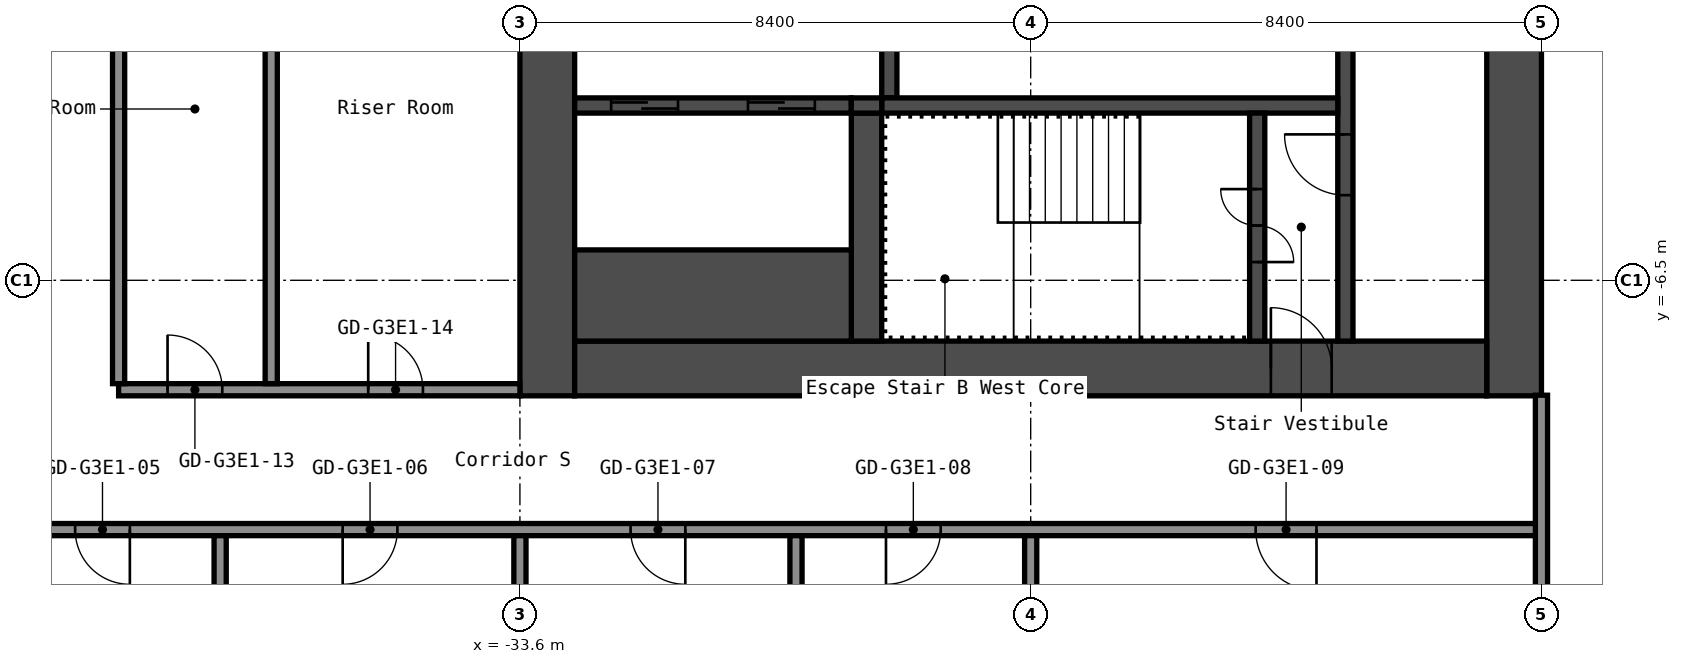
"""IFC4 building model, lengths in metres.
Left out: names, types, materials, properties, quantities, classifications, styles, units other than length and angle.
Written with IfcOpenShell. Run it as: python <this file> out.ifc"""

import sys

from ifc_helpers import new_model, si_unit, direction, frame, frame_2d, origin, place, context, subcontext, project, spatial, rectangle, extrude, element, fill, save


model = new_model("IFC4")
c1 = context("Model", 3, precision=1e-05, world=origin(), true_north=direction((0.0, 1.0)))
c2 = subcontext(c1, "Body", "Model", "MODEL_VIEW")
j1 = project(units=[si_unit("LENGTHUNIT", "METRE"), si_unit("PLANEANGLEUNIT", "RADIAN")], contexts=[c1])
p1 = place(None, origin())
s1 = spatial("IfcSite", under=j1, at=p1, CompositionType="ELEMENT")
p2 = place(p1, origin())
s2 = spatial("IfcBuilding", under=s1, at=p2, CompositionType="ELEMENT")
p3 = place(p2, frame((0.0, 0.0, 159.8)))
s3 = spatial("IfcBuildingStorey", under=s2, at=p3, CompositionType="ELEMENT", Elevation=159.8)
p4 = place(p3, frame((-17.25, -8.4, 0.0), z_axis=(0.0, 0.0, 1.0), x_axis=(0.0, 1.0, 0.0)))
e1 = element("IfcWall", 1, at=p4, inside=s3, PredefinedType="SHEAR", context=c2, shape_type="SweptSolid", body=[
    extrude(rectangle(XDim=16.8, YDim=0.9, at=frame_2d((8.4, 0.0))), origin(), (0.0, 0.0, 1.0), 2.75),
])
p5 = place(p4, frame((7.1, 0.0, 0.0)))
e2 = element("IfcOpeningElement", 2, at=p5, cuts=e1, PredefinedType="OPENING", context=c2, shape_type="SweptSolid", body=[
    extrude(rectangle(XDim=1.6, YDim=2.1, at=frame_2d((0.8, 1.05))), frame((0.0, 0.46, 0.0), z_axis=(0.0, -1.0, 0.0), x_axis=(1.0, 0.0, 0.0)), (0.0, 0.0, 1.0), 0.92),
])
p6 = place(p3, frame((-33.15, -8.4, 0.0), z_axis=(0.0, 0.0, 1.0), x_axis=(0.0, 1.0, 0.0)))
e3 = element("IfcWall", 3, at=p6, inside=s3, PredefinedType="SHEAR", context=c2, shape_type="SweptSolid", body=[
    extrude(rectangle(XDim=16.8, YDim=0.9, at=frame_2d((8.4, 0.0))), origin(), (0.0, 0.0, 1.0), 2.75),
])
p7 = place(p3, frame((-32.7, -7.95, 0.0), z_axis=(0.0, 0.0, 1.0), x_axis=(1.0, 0.0, 0.0)))
e4 = element("IfcWall", 4, at=p7, inside=s3, PredefinedType="SHEAR", context=c2, shape_type="SweptSolid", body=[
    extrude(rectangle(XDim=15.0, YDim=0.9, at=frame_2d((7.5, 0.0))), origin(), (0.0, 0.0, 1.0), 2.75),
])
p8 = place(p7, frame((11.45, 0.0, 0.0)))
e5 = element("IfcOpeningElement", 5, at=p8, cuts=e4, PredefinedType="OPENING", context=c2, shape_type="SweptSolid", body=[
    extrude(rectangle(XDim=1.0, YDim=2.1, at=frame_2d((0.5, 1.05))), frame((0.0, 0.46, 0.0), z_axis=(0.0, -1.0, 0.0), x_axis=(1.0, 0.0, 0.0)), (0.0, 0.0, 1.0), 0.92),
])
p9 = place(p3, frame((-20.025, -7.5, 0.0), z_axis=(0.0, 0.0, 1.0), x_axis=(0.0, 1.0, 0.0)))
e6 = element("IfcWall", 6, at=p9, inside=s3, PredefinedType="SHEAR", context=c2, shape_type="SweptSolid", body=[
    extrude(rectangle(XDim=6.3, YDim=0.25, at=frame_2d((3.15, 0.0))), origin(), (0.0, 0.0, 1.0), 2.75),
])
p10 = place(p9, frame((2.4, 0.0, 0.0)))
e7 = element("IfcOpeningElement", 7, at=p10, cuts=e6, PredefinedType="OPENING", context=c2, shape_type="SweptSolid", body=[
    extrude(rectangle(XDim=1.0, YDim=2.1, at=frame_2d((0.5, 1.05))), frame((0.0, 0.135, 0.0), z_axis=(0.0, -1.0, 0.0), x_axis=(1.0, 0.0, 0.0)), (0.0, 0.0, 1.0), 0.27),
])
p11 = place(p3, frame((-27.525, -3.5, 0.0), z_axis=(0.0, 0.0, 1.0), x_axis=(0.0, 1.0, 0.0)))
e8 = element("IfcWall", 8, at=p11, inside=s3, PredefinedType="SHEAR", context=c2, shape_type="SweptSolid", body=[
    extrude(rectangle(XDim=2.05, YDim=0.25, at=frame_2d((1.025, 0.0))), origin(), (0.0, 0.0, 1.0), 2.75),
])
p12 = place(p3, frame((-27.65, -3.625, 0.0), z_axis=(0.0, 0.0, 1.0), x_axis=(1.0, 0.0, 0.0)))
e9 = element("IfcWall", 9, at=p12, inside=s3, PredefinedType="SHEAR", context=c2, shape_type="SweptSolid", body=[
    extrude(rectangle(XDim=7.5, YDim=0.25, at=frame_2d((3.75, 0.0))), origin(), (0.0, 0.0, 1.0), 2.75),
])
p13 = place(p3, frame((-21.475, -7.5, 0.0), z_axis=(0.0, 0.0, 1.0), x_axis=(0.0, 1.0, 0.0)))
e10 = element("IfcWall", 10, at=p13, inside=s3, PredefinedType="SHEAR", context=c2, shape_type="SweptSolid", body=[
    extrude(rectangle(XDim=3.75, YDim=0.25, at=frame_2d((1.875, 0.0))), origin(), (0.0, 0.0, 1.0), 2.75),
])
p14 = place(p13, frame((1.3, 0.0, 0.0)))
e11 = element("IfcOpeningElement", 11, at=p14, cuts=e10, PredefinedType="OPENING", context=c2, shape_type="SweptSolid", body=[
    extrude(rectangle(XDim=1.2, YDim=2.1, at=frame_2d((0.6, 1.05))), frame((0.0, 0.135, 0.0), z_axis=(0.0, -1.0, 0.0), x_axis=(1.0, 0.0, 0.0)), (0.0, 0.0, 1.0), 0.27),
])
p15 = place(p3, frame((-27.9, -7.5, 0.0), z_axis=(0.0, 0.0, 1.0), x_axis=(0.0, 1.0, 0.0)))
e12 = element("IfcWall", 12, at=p15, inside=s3, PredefinedType="SHEAR", context=c2, shape_type="SweptSolid", body=[
    extrude(rectangle(XDim=3.75, YDim=0.5, at=frame_2d((1.875, 0.0))), origin(), (0.0, 0.0, 1.0), 2.75),
])
p16 = place(p3, frame((-32.7, -3.625, 0.0), z_axis=(0.0, 0.0, 1.0), x_axis=(1.0, 0.0, 0.0)))
e13 = element("IfcWall", 13, at=p16, inside=s3, PredefinedType="SHEAR", context=c2, shape_type="SweptSolid", body=[
    extrude(rectangle(XDim=4.55, YDim=0.25, at=frame_2d((2.275, 0.0))), origin(), (0.0, 0.0, 1.0), 2.75),
])
p17 = place(p16, frame((2.85, 0.0, 0.0)))
e14 = element("IfcOpeningElement", 14, at=p17, cuts=e13, PredefinedType="OPENING", context=c2, shape_type="SweptSolid", body=[
    extrude(rectangle(XDim=1.1, YDim=2.1, at=frame_2d((0.55, 1.05))), frame((0.0, 0.135, 0.0), z_axis=(0.0, -1.0, 0.0), x_axis=(1.0, 0.0, 0.0)), (0.0, 0.0, 1.0), 0.27),
])
p18 = place(p16, frame((0.6, 0.0, 0.0)))
e15 = element("IfcOpeningElement", 15, at=p18, cuts=e13, PredefinedType="OPENING", context=c2, shape_type="SweptSolid", body=[
    extrude(rectangle(XDim=1.1, YDim=2.1, at=frame_2d((0.55, 1.05))), frame((0.0, 0.135, 0.0), z_axis=(0.0, -1.0, 0.0), x_axis=(1.0, 0.0, 0.0)), (0.0, 0.0, 1.0), 0.27),
])
p19 = place(p3, frame((-32.7, -6.75, 0.0), z_axis=(0.0, 0.0, 1.0), x_axis=(1.0, 0.0, 0.0)))
e16 = element("IfcWall", 16, at=p19, inside=s3, PredefinedType="SHEAR", context=c2, shape_type="SweptSolid", body=[
    extrude(rectangle(XDim=4.55, YDim=1.5, at=frame_2d((2.275, 0.0))), origin(), (0.0, 0.0, 1.0), 2.75),
])
p20 = place(p3, frame((-28.15, -3.625, 0.0), z_axis=(0.0, 0.0, 1.0), x_axis=(1.0, 0.0, 0.0)))
e17 = element("IfcWall", 17, at=p20, inside=s3, PredefinedType="SHEAR", context=c2, shape_type="SweptSolid", body=[
    extrude(rectangle(XDim=0.5, YDim=0.25, at=frame_2d((0.25, 0.0))), origin(), (0.0, 0.0, 1.0), 2.75),
])
p21 = place(p3, frame((-42.7, -10.6, 0.0), z_axis=(0.0, 0.0, 1.0), x_axis=(1.0, 0.0, 0.0)))
e18 = element("IfcWall", 18, at=p21, inside=s3, PredefinedType="PARTITIONING", context=c2, shape_type="SweptSolid", body=[
    extrude(rectangle(XDim=25.9, YDim=0.2, at=frame_2d((12.95, 0.0))), origin(), (0.0, 0.0, 1.0), 2.75),
])
p22 = place(p21, frame((1.785, 0.0, 0.0)))
e19 = element("IfcOpeningElement", 19, at=p22, cuts=e18, PredefinedType="OPENING", context=c2, shape_type="SweptSolid", body=[
    extrude(rectangle(XDim=0.9, YDim=2.1, at=frame_2d((0.45, 1.05))), frame((0.0, 0.11, 0.0), z_axis=(0.0, -1.0, 0.0), x_axis=(1.0, 0.0, 0.0)), (0.0, 0.0, 1.0), 0.22),
])
p23 = place(p21, frame((6.185, 0.0, 0.0)))
e20 = element("IfcOpeningElement", 20, at=p23, cuts=e18, PredefinedType="OPENING", context=c2, shape_type="SweptSolid", body=[
    extrude(rectangle(XDim=0.9, YDim=2.1, at=frame_2d((0.45, 1.05))), frame((0.0, 0.11, 0.0), z_axis=(0.0, -1.0, 0.0), x_axis=(1.0, 0.0, 0.0)), (0.0, 0.0, 1.0), 0.22),
])
p24 = place(p21, frame((10.92, 0.0, 0.0)))
e21 = element("IfcOpeningElement", 21, at=p24, cuts=e18, PredefinedType="OPENING", context=c2, shape_type="SweptSolid", body=[
    extrude(rectangle(XDim=0.9, YDim=2.1, at=frame_2d((0.45, 1.05))), frame((0.0, 0.11, 0.0), z_axis=(0.0, -1.0, 0.0), x_axis=(1.0, 0.0, 0.0)), (0.0, 0.0, 1.0), 0.22),
])
p25 = place(p21, frame((15.12, 0.0, 0.0)))
e22 = element("IfcOpeningElement", 22, at=p25, cuts=e18, PredefinedType="OPENING", context=c2, shape_type="SweptSolid", body=[
    extrude(rectangle(XDim=0.9, YDim=2.1, at=frame_2d((0.45, 1.05))), frame((0.0, 0.11, 0.0), z_axis=(0.0, -1.0, 0.0), x_axis=(1.0, 0.0, 0.0)), (0.0, 0.0, 1.0), 0.22),
])
p26 = place(p21, frame((21.2, 0.0, 0.0)))
e23 = element("IfcOpeningElement", 23, at=p26, cuts=e18, PredefinedType="OPENING", context=c2, shape_type="SweptSolid", body=[
    extrude(rectangle(XDim=1.0, YDim=2.1, at=frame_2d((0.5, 1.05))), frame((0.0, 0.11, 0.0), z_axis=(0.0, -1.0, 0.0), x_axis=(1.0, 0.0, 0.0)), (0.0, 0.0, 1.0), 0.22),
])
p27 = place(p3, frame((-40.2, -8.3, 0.0), z_axis=(0.0, 0.0, 1.0), x_axis=(1.0, 0.0, 0.0)))
e24 = element("IfcWall", 24, at=p27, inside=s3, PredefinedType="PARTITIONING", context=c2, shape_type="SweptSolid", body=[
    extrude(rectangle(XDim=6.6, YDim=0.2, at=frame_2d((3.3, 0.0))), origin(), (0.0, 0.0, 1.0), 2.75),
])
p28 = place(p27, frame((0.805, 0.0, 0.0)))
e25 = element("IfcOpeningElement", 25, at=p28, cuts=e24, PredefinedType="OPENING", context=c2, shape_type="SweptSolid", body=[
    extrude(rectangle(XDim=0.9, YDim=2.1, at=frame_2d((0.45, 1.05))), frame((0.0, 0.11, 0.0), z_axis=(0.0, -1.0, 0.0), x_axis=(1.0, 0.0, 0.0)), (0.0, 0.0, 1.0), 0.22),
])
p29 = place(p27, frame((4.105, 0.0, 0.0)))
e26 = element("IfcOpeningElement", 26, at=p29, cuts=e24, PredefinedType="OPENING", context=c2, shape_type="SweptSolid", body=[
    extrude(rectangle(XDim=0.9, YDim=2.1, at=frame_2d((0.45, 1.05))), frame((0.0, 0.11, 0.0), z_axis=(0.0, -1.0, 0.0), x_axis=(1.0, 0.0, 0.0)), (0.0, 0.0, 1.0), 0.22),
])
p30 = place(p3, frame((-40.2, -8.2, 0.0), z_axis=(0.0, 0.0, 1.0), x_axis=(0.0, 1.0, 0.0)))
e27 = element("IfcWall", 27, at=p30, inside=s3, PredefinedType="PARTITIONING", context=c2, shape_type="SweptSolid", body=[
    extrude(rectangle(XDim=16.4, YDim=0.2, at=frame_2d((8.2, 0.0))), origin(), (0.0, 0.0, 1.0), 2.75),
])
p31 = place(p3, frame((-38.53, -19.3, 0.0), z_axis=(0.0, 0.0, 1.0), x_axis=(0.0, 1.0, 0.0)))
e28 = element("IfcWall", 28, at=p31, inside=s3, PredefinedType="PARTITIONING", context=c2, shape_type="SweptSolid", body=[
    extrude(rectangle(XDim=8.6, YDim=0.2, at=frame_2d((4.3, 0.0))), origin(), (0.0, 0.0, 1.0), 2.75),
])
p32 = place(p3, frame((-37.69, -8.2, 0.0), z_axis=(0.0, 0.0, 1.0), x_axis=(0.0, 1.0, 0.0)))
e29 = element("IfcWall", 29, at=p32, inside=s3, PredefinedType="PARTITIONING", context=c2, shape_type="SweptSolid", body=[
    extrude(rectangle(XDim=8.2, YDim=0.2, at=frame_2d((4.1, 0.0))), origin(), (0.0, 0.0, 1.0), 2.75),
])
for number, where, z_axis, x_axis in (
    (30, (-33.6, -19.3, 0.0), (0.0, 0.0, 1.0), (0.0, 1.0, 0.0)),
    (31, (-29.06, -19.3, 0.0), (0.0, 0.0, 1.0), (0.0, 1.0, 0.0)),
    (32, (-25.2, -19.3, 0.0), (0.0, 0.0, 1.0), (0.0, 1.0, 0.0)),
):
    element("IfcWall", number, at=place(p3, frame(where, z_axis=z_axis, x_axis=x_axis)), inside=s3, PredefinedType="PARTITIONING", context=c2, shape_type="SweptSolid", body=[
        extrude(rectangle(XDim=8.6, YDim=0.2, at=frame_2d((4.3, 0.0))), origin(), (0.0, 0.0, 1.0), 2.75),
    ])
p33 = place(p3, frame((-16.8, -19.3, 0.0), z_axis=(0.0, 0.0, 1.0), x_axis=(0.0, 1.0, 0.0)))
e33 = element("IfcWall", 33, at=p33, inside=s3, PredefinedType="PARTITIONING", context=c2, shape_type="SweptSolid", body=[
    extrude(rectangle(XDim=10.91, YDim=0.2, at=frame_2d((5.455, 0.0))), origin(), (0.0, 0.0, 1.0), 2.75),
])
p34 = place(p8, origin())
e34 = element("IfcDoor", 34, at=p34, inside=s3, OperationType="SINGLE_SWING_RIGHT", PredefinedType="DOOR", context=c2, shape_type="SweptSolid", body=[
    extrude(rectangle(XDim=1.0, YDim=2.1, at=frame_2d((0.5, 1.05))), frame((0.0, 0.025, 0.0), z_axis=(0.0, -1.0, 0.0), x_axis=(1.0, 0.0, 0.0)), (0.0, 0.0, 1.0), 0.05),
])
fill(e5, e34)
p35 = place(p14, origin())
e35 = element("IfcDoor", 35, at=p35, inside=s3, OperationType="DOUBLE_DOOR_SINGLE_SWING", PredefinedType="DOOR", context=c2, shape_type="SweptSolid", body=[
    extrude(rectangle(XDim=1.2, YDim=2.1, at=frame_2d((0.6, 1.05))), frame((0.0, 0.025, 0.0), z_axis=(0.0, -1.0, 0.0), x_axis=(1.0, 0.0, 0.0)), (0.0, 0.0, 1.0), 0.05),
])
fill(e11, e35)
p36 = place(p10, origin())
e36 = element("IfcDoor", 36, at=p36, inside=s3, OperationType="SINGLE_SWING_LEFT", PredefinedType="DOOR", context=c2, shape_type="SweptSolid", body=[
    extrude(rectangle(XDim=1.0, YDim=2.1, at=frame_2d((0.5, 1.05))), frame((0.0, 0.025, 0.0), z_axis=(0.0, -1.0, 0.0), x_axis=(1.0, 0.0, 0.0)), (0.0, 0.0, 1.0), 0.05),
])
fill(e7, e36)
p37 = place(p17, origin())
e37 = element("IfcDoor", 37, at=p37, inside=s3, OperationType="DOUBLE_DOOR_SLIDING", PredefinedType="DOOR", context=c2, shape_type="SweptSolid", body=[
    extrude(rectangle(XDim=1.1, YDim=2.1, at=frame_2d((0.55, 1.05))), frame((0.0, 0.025, 0.0), z_axis=(0.0, -1.0, 0.0), x_axis=(1.0, 0.0, 0.0)), (0.0, 0.0, 1.0), 0.05),
])
fill(e14, e37)
p38 = place(p18, origin())
e38 = element("IfcDoor", 38, at=p38, inside=s3, OperationType="DOUBLE_DOOR_SLIDING", PredefinedType="DOOR", context=c2, shape_type="SweptSolid", body=[
    extrude(rectangle(XDim=1.1, YDim=2.1, at=frame_2d((0.55, 1.05))), frame((0.0, 0.025, 0.0), z_axis=(0.0, -1.0, 0.0), x_axis=(1.0, 0.0, 0.0)), (0.0, 0.0, 1.0), 0.05),
])
fill(e15, e38)
p39 = place(p22, origin())
e39 = element("IfcDoor", 39, at=p39, inside=s3, OperationType="SINGLE_SWING_RIGHT", PredefinedType="DOOR", context=c2, shape_type="SweptSolid", body=[
    extrude(rectangle(XDim=0.9, YDim=2.1, at=frame_2d((0.45, 1.05))), frame((0.0, 0.025, 0.0), z_axis=(0.0, -1.0, 0.0), x_axis=(1.0, 0.0, 0.0)), (0.0, 0.0, 1.0), 0.05),
])
fill(e19, e39)
p40 = place(p23, origin())
e40 = element("IfcDoor", 40, at=p40, inside=s3, OperationType="SINGLE_SWING_LEFT", PredefinedType="DOOR", context=c2, shape_type="SweptSolid", body=[
    extrude(rectangle(XDim=0.9, YDim=2.1, at=frame_2d((0.45, 1.05))), frame((0.0, 0.025, 0.0), z_axis=(0.0, -1.0, 0.0), x_axis=(1.0, 0.0, 0.0)), (0.0, 0.0, 1.0), 0.05),
])
fill(e20, e40)
p41 = place(p24, origin())
e41 = element("IfcDoor", 41, at=p41, inside=s3, OperationType="SINGLE_SWING_RIGHT", PredefinedType="DOOR", context=c2, shape_type="SweptSolid", body=[
    extrude(rectangle(XDim=0.9, YDim=2.1, at=frame_2d((0.45, 1.05))), frame((0.0, 0.025, 0.0), z_axis=(0.0, -1.0, 0.0), x_axis=(1.0, 0.0, 0.0)), (0.0, 0.0, 1.0), 0.05),
])
fill(e21, e41)
p42 = place(p25, origin())
e42 = element("IfcDoor", 42, at=p42, inside=s3, OperationType="SINGLE_SWING_LEFT", PredefinedType="DOOR", context=c2, shape_type="SweptSolid", body=[
    extrude(rectangle(XDim=0.9, YDim=2.1, at=frame_2d((0.45, 1.05))), frame((0.0, 0.025, 0.0), z_axis=(0.0, -1.0, 0.0), x_axis=(1.0, 0.0, 0.0)), (0.0, 0.0, 1.0), 0.05),
])
fill(e22, e42)
p43 = place(p26, origin())
e43 = element("IfcDoor", 43, at=p43, inside=s3, OperationType="SINGLE_SWING_RIGHT", PredefinedType="DOOR", context=c2, shape_type="SweptSolid", body=[
    extrude(rectangle(XDim=1.0, YDim=2.1, at=frame_2d((0.5, 1.05))), frame((0.0, 0.025, 0.0), z_axis=(0.0, -1.0, 0.0), x_axis=(1.0, 0.0, 0.0)), (0.0, 0.0, 1.0), 0.05),
])
fill(e23, e43)
p44 = place(p28, origin())
e44 = element("IfcDoor", 44, at=p44, inside=s3, OperationType="SINGLE_SWING_RIGHT", PredefinedType="DOOR", context=c2, shape_type="SweptSolid", body=[
    extrude(rectangle(XDim=0.9, YDim=2.1, at=frame_2d((0.45, 1.05))), frame((0.0, 0.025, 0.0), z_axis=(0.0, -1.0, 0.0), x_axis=(1.0, 0.0, 0.0)), (0.0, 0.0, 1.0), 0.05),
])
fill(e25, e44)
p45 = place(p29, origin())
e45 = element("IfcDoor", 45, at=p45, inside=s3, OperationType="SINGLE_SWING_RIGHT", PredefinedType="DOOR", context=c2, shape_type="SweptSolid", body=[
    extrude(rectangle(XDim=0.9, YDim=2.1, at=frame_2d((0.45, 1.05))), frame((0.0, 0.025, 0.0), z_axis=(0.0, -1.0, 0.0), x_axis=(1.0, 0.0, 0.0)), (0.0, 0.0, 1.0), 0.05),
])
fill(e26, e45)
save(model, sys.argv[1])
